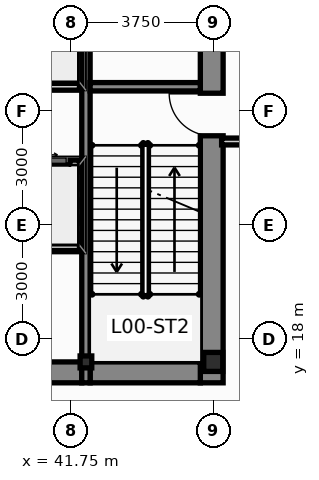
"""IFC4 building model, lengths in metres.
Left out: names, types, materials, properties, quantities, classifications, styles, units other than length and angle.
Written with IfcOpenShell. Run it as: python <this file> out.ifc"""

import sys

from ifc_helpers import new_model, si_unit, direction, frame, frame_2d, origin, origin_2d, place, context, subcontext, project, spatial, rectangle, i_section, extrude, source, transform, mapped, element, fill, save


model = new_model("IFC4")
c1 = context("Model", 3, precision=1e-05, world=origin(), true_north=direction((0.0, 1.0)))
c2 = subcontext(c1, "Body", "Model", "MODEL_VIEW")
j1 = project(units=[si_unit("LENGTHUNIT", "METRE"), si_unit("PLANEANGLEUNIT", "RADIAN")], contexts=[c1])
p1 = place(None, origin())
s1 = spatial("IfcSite", under=j1, at=p1, CompositionType="ELEMENT")
p2 = place(p1, origin())
s2 = spatial("IfcBuilding", under=s1, at=p2, CompositionType="ELEMENT")
p3 = place(p2, origin())
s3 = spatial("IfcBuildingStorey", under=s2, at=p3, CompositionType="ELEMENT", Elevation=0.0)
m1 = source(origin(), c2, "Body", "SweptSolid", [
    extrude(i_section(OverallWidth=0.5, OverallDepth=0.5, WebThickness=0.028, FlangeThickness=0.04, at=origin_2d()), origin(), (0.0, 0.0, 1.0), 5.4),
])
p4 = place(p3, frame((45.5, 17.4, 0.0), z_axis=(0.0, 0.0, 1.0), x_axis=(1.0, 0.0, 0.0)))
e1 = element("IfcColumn", 1, at=p4, inside=s3, PredefinedType="COLUMN", context=c2, shape_type="MappedRepresentation", body=[
    mapped(m1, transform((0.0, 0.0, 0.0), scale=1.0)),
])
m2 = source(origin(), c2, "Body", "SweptSolid", [
    extrude(i_section(OverallWidth=0.307, OverallDepth=0.315, WebThickness=0.012, FlangeThickness=0.019, at=origin_2d()), origin(), (0.0, 0.0, 1.0), 5.4),
])
p5 = place(p3, frame((42.15, 17.4, 0.0), z_axis=(0.0, 0.0, 1.0), x_axis=(1.0, 0.0, 0.0)))
e2 = element("IfcColumn", 2, at=p5, inside=s3, PredefinedType="COLUMN", context=c2, shape_type="MappedRepresentation", body=[
    mapped(m2, transform((0.0, 0.0, 0.0), scale=1.0)),
])
p6 = place(p3, frame((45.46, 16.85, 0.0), z_axis=(0.0, 0.0, 1.0), x_axis=(0.0, 1.0, 0.0)))
e3 = element("IfcWall", 3, at=p6, inside=s3, PredefinedType="SHEAR", context=c2, shape_type="SweptSolid", body=[
    extrude(rectangle(XDim=13.425, YDim=0.6, at=frame_2d((6.712, 0.0))), origin(), (0.0, 0.0, 1.0), 5.4),
])
p7 = place(p6, frame((6.5, 0.0, 0.0)))
e4 = element("IfcOpeningElement", 4, at=p7, cuts=e3, PredefinedType="OPENING", context=c2, shape_type="SweptSolid", body=[
    extrude(rectangle(XDim=1.12, YDim=2.15, at=frame_2d((0.56, 1.075))), frame((0.0, 0.312, 0.0), z_axis=(0.0, -1.0, 0.0), x_axis=(1.0, 0.0, 0.0)), (0.0, 0.0, 1.0), 0.624),
])
p8 = place(p6, frame((10.95, 0.0, 0.0)))
e5 = element("IfcOpeningElement", 5, at=p8, cuts=e3, PredefinedType="OPENING", context=c2, shape_type="SweptSolid", body=[
    extrude(rectangle(XDim=1.2, YDim=2.2, at=frame_2d((0.6, 1.1))), frame((0.0, 0.312, 0.0), z_axis=(0.0, -1.0, 0.0), x_axis=(1.0, 0.0, 0.0)), (0.0, 0.0, 1.0), 0.624),
])
p9 = place(p3, frame((33.96, 17.125, 0.0), z_axis=(0.0, 0.0, 1.0), x_axis=(1.0, 0.0, 0.0)))
e6 = element("IfcWall", 6, at=p9, inside=s3, PredefinedType="SHEAR", context=c2, shape_type="SweptSolid", body=[
    extrude(rectangle(XDim=8.08, YDim=0.55, at=frame_2d((4.04, 0.0))), origin(), (0.0, 0.0, 1.0), 5.4),
])
p10 = place(p3, frame((42.26, 17.125, 0.0), z_axis=(0.0, 0.0, 1.0), x_axis=(1.0, 0.0, 0.0)))
e7 = element("IfcWall", 7, at=p10, inside=s3, PredefinedType="SHEAR", context=c2, shape_type="SweptSolid", body=[
    extrude(rectangle(XDim=2.9, YDim=0.55, at=frame_2d((1.45, 0.0))), origin(), (0.0, 0.0, 1.0), 5.4),
])
p11 = place(p3, frame((42.15, 16.85, 0.0), z_axis=(0.0, 0.0, 1.0), x_axis=(0.0, 1.0, 0.0)))
e8 = element("IfcWall", 8, at=p11, inside=s3, PredefinedType="SHEAR", context=c2, shape_type="SweptSolid", body=[
    extrude(rectangle(XDim=13.425, YDim=0.22, at=frame_2d((6.712, 0.0))), origin(), (0.0, 0.0, 1.0), 5.4),
])
p12 = place(p3, frame((42.26, 24.64, 0.0), z_axis=(0.0, 0.0, 1.0), x_axis=(1.0, 0.0, 0.0)))
e9 = element("IfcWall", 9, at=p12, inside=s3, PredefinedType="SHEAR", context=c2, shape_type="SweptSolid", body=[
    extrude(rectangle(XDim=2.9, YDim=0.22, at=frame_2d((1.45, 0.0))), origin(), (0.0, 0.0, 1.0), 5.4),
])
p13 = place(p3, frame((40.28, 22.62, 0.0), z_axis=(0.0, 0.0, 1.0), x_axis=(1.0, 0.0, 0.0)))
e10 = element("IfcWall", 10, at=p13, inside=s3, PredefinedType="PARTITIONING", context=c2, shape_type="SweptSolid", body=[
    extrude(rectangle(XDim=1.7, YDim=0.18, at=frame_2d((0.85, 0.0))), origin(), (0.0, 0.0, 1.0), 5.08),
])
p14 = place(p13, frame((0.35, 0.0, 0.0)))
e11 = element("IfcOpeningElement", 11, at=p14, cuts=e10, PredefinedType="OPENING", context=c2, shape_type="SweptSolid", body=[
    extrude(rectangle(XDim=1.1, YDim=2.2, at=frame_2d((0.55, 1.1))), frame((0.0, 0.102, 0.0), z_axis=(0.0, -1.0, 0.0), x_axis=(1.0, 0.0, 0.0)), (0.0, 0.0, 1.0), 0.204),
])
p15 = place(p3, frame((40.2, 24.64, 0.0), z_axis=(0.0, 0.0, 1.0), x_axis=(1.0, 0.0, 0.0)))
e12 = element("IfcWall", 12, at=p15, inside=s3, PredefinedType="PARTITIONING", context=c2, shape_type="SweptSolid", body=[
    extrude(rectangle(XDim=1.78, YDim=0.18, at=frame_2d((0.89, 0.0))), origin(), (0.0, 0.0, 1.0), 5.08),
])
p16 = place(p3, frame((45.72, 23.2, 0.0), z_axis=(0.0, 0.0, 1.0), x_axis=(1.0, 0.0, 0.0)))
e13 = element("IfcWall", 13, at=p16, inside=s3, PredefinedType="PARTITIONING", context=c2, shape_type="SweptSolid", body=[
    extrude(rectangle(XDim=2.76, YDim=0.18, at=frame_2d((1.38, 0.0))), origin(), (0.0, 0.0, 1.0), 5.08),
])
p17 = place(p3, frame((40.22, 20.42, 0.0), z_axis=(0.0, 0.0, 1.0), x_axis=(1.0, 0.0, 0.0)))
e14 = element("IfcWall", 14, at=p17, inside=s3, PredefinedType="PARTITIONING", context=c2, shape_type="SweptSolid", body=[
    extrude(rectangle(XDim=1.76, YDim=0.18, at=frame_2d((0.88, 0.0))), origin(), (0.0, 0.0, 1.0), 5.08),
])
p18 = place(p7, origin())
e15 = element("IfcDoor", 15, at=p18, inside=s3, OperationType="SINGLE_SWING_RIGHT", PredefinedType="DOOR", context=c2, shape_type="SweptSolid", body=[
    extrude(rectangle(XDim=1.12, YDim=2.15, at=frame_2d((0.56, 1.075))), frame((0.0, 0.025, 0.0), z_axis=(0.0, -1.0, 0.0), x_axis=(1.0, 0.0, 0.0)), (0.0, 0.0, 1.0), 0.05),
])
fill(e4, e15)
p19 = place(p14, origin())
e16 = element("IfcDoor", 16, at=p19, inside=s3, OperationType="SLIDING_TO_LEFT", PredefinedType="DOOR", context=c2, shape_type="SweptSolid", body=[
    extrude(rectangle(XDim=1.1, YDim=2.2, at=frame_2d((0.55, 1.1))), frame((0.0, 0.025, 0.0), z_axis=(0.0, -1.0, 0.0), x_axis=(1.0, 0.0, 0.0)), (0.0, 0.0, 1.0), 0.05),
])
fill(e11, e16)
save(model, sys.argv[1])
